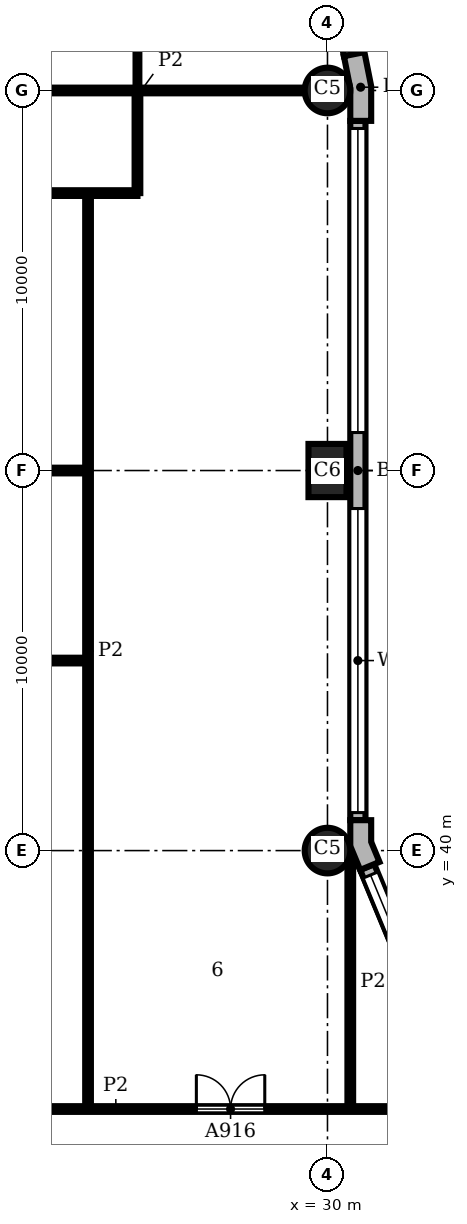
"""IFC4 building model, lengths in metres.
Left out: names, types, materials, properties, quantities, classifications, styles, units other than length and angle.
Written with IfcOpenShell. Run it as: python <this file> out.ifc"""

import sys

from ifc_helpers import new_model, si_unit, direction, frame, frame_2d, origin, origin_2d, place, context, subcontext, project, spatial, polyline, rectangle, circle, outline, extrude, element, fill, save


model = new_model("IFC4")
c1 = context("Model", 3, precision=1e-05, world=origin(), true_north=direction((0.0, 1.0)))
c2 = subcontext(c1, "Body", "Model", "MODEL_VIEW")
j1 = project(units=[si_unit("LENGTHUNIT", "METRE"), si_unit("PLANEANGLEUNIT", "RADIAN")], contexts=[c1])
p1 = place(None, origin())
s1 = spatial("IfcSite", under=j1, at=p1, CompositionType="ELEMENT")
p2 = place(p1, origin())
s2 = spatial("IfcBuilding", under=s1, at=p2, CompositionType="ELEMENT")
p3 = place(p2, frame((0.0, 0.0, 105.6)))
s3 = spatial("IfcBuildingStorey", under=s2, at=p3, CompositionType="ELEMENT", Elevation=105.6)
p4 = place(p3, frame((30.0, 40.0, 0.0), z_axis=(0.0, 0.0, 1.0), x_axis=(1.0, 0.0, 0.0)))
e1 = element("IfcColumn", 1, at=p4, inside=s3, PredefinedType="COLUMN", context=c2, shape_type="SweptSolid", body=[
    extrude(circle(Radius=0.6, at=origin_2d()), origin(), (0.0, 0.0, 1.0), 3.9),
])
p5 = place(p3, frame((30.0, 50.0, 0.0), z_axis=(0.0, 0.0, 1.0), x_axis=(0.0, 1.0, 0.0)))
e2 = element("IfcColumn", 2, at=p5, inside=s3, PredefinedType="COLUMN", context=c2, shape_type="SweptSolid", body=[
    extrude(rectangle(XDim=1.4, YDim=1.0, at=origin_2d()), origin(), (0.0, 0.0, 1.0), 3.9),
])
p6 = place(p3, frame((30.0, 60.0, 0.0), z_axis=(0.0, 0.0, 1.0), x_axis=(1.0, 0.0, 0.0)))
e3 = element("IfcColumn", 3, at=p6, inside=s3, PredefinedType="COLUMN", context=c2, shape_type="SweptSolid", body=[
    extrude(circle(Radius=0.6, at=origin_2d()), origin(), (0.0, 0.0, 1.0), 3.9),
])
p7 = place(p3, origin())
e4 = element("IfcWall", 4, at=p7, inside=s3, PredefinedType="SOLIDWALL", context=c2, shape_type="SweptSolid", body=[
    extrude(outline(polyline([(31.23, 39.644), (31.369, 39.701), (31.15, 40.229), (31.15, 40.8), (31.0, 40.8), (30.6, 40.8), (30.6, 40.119), (30.861, 39.49), (31.23, 39.644)])), origin(), (0.0, 0.0, 1.0), 3.9),
])
e5 = element("IfcWall", 5, at=p7, inside=s3, PredefinedType="SOLIDWALL", context=c2, shape_type="SweptSolid", body=[
    extrude(outline(polyline([(31.0, 59.2), (31.15, 59.2), (31.15, 60.113), (30.972, 61.009), (30.825, 60.98), (30.432, 60.902), (30.6, 60.059), (30.6, 59.2), (31.0, 59.2)])), origin(), (0.0, 0.0, 1.0), 3.9),
])
p8 = place(p3, frame((33.362, 33.974, 0.0), z_axis=(0.0, 0.0, 1.0), x_axis=(-0.382655745237, 0.923891000409, 0.0)))
e6 = element("IfcWall", 6, at=p8, inside=s3, PredefinedType="SOLIDWALL", context=c2, shape_type="SweptSolid", body=[
    extrude(rectangle(XDim=6.053, YDim=0.4, at=frame_2d((3.027, 0.0))), origin(), (0.0, 0.0, 1.0), 3.9),
])
p9 = place(p8, frame((0.227, 0.0, 0.9)))
e7 = element("IfcOpeningElement", 7, at=p9, cuts=e6, PredefinedType="OPENING", context=c2, shape_type="SweptSolid", body=[
    extrude(rectangle(XDim=5.6, YDim=2.35, at=frame_2d((2.8, 1.175))), frame((0.0, 0.21, 0.0), z_axis=(0.0, -1.0, 0.0), x_axis=(1.0, 0.0, 0.0)), (0.0, 0.0, 1.0), 0.42),
])
p10 = place(p3, frame((30.8, 40.8, 0.0), z_axis=(0.0, 0.0, 1.0), x_axis=(0.0, 1.0, 0.0)))
e8 = element("IfcWall", 8, at=p10, inside=s3, PredefinedType="SOLIDWALL", context=c2, shape_type="SweptSolid", body=[
    extrude(rectangle(XDim=18.4, YDim=0.4, at=frame_2d((9.2, 0.0))), origin(), (0.0, 0.0, 1.0), 3.9),
])
p11 = place(p10, frame((0.2, 0.0, 0.9)))
e9 = element("IfcOpeningElement", 9, at=p11, cuts=e8, PredefinedType="OPENING", context=c2, shape_type="SweptSolid", body=[
    extrude(rectangle(XDim=8.0, YDim=2.35, at=frame_2d((4.0, 1.175))), frame((0.0, 0.21, 0.0), z_axis=(0.0, -1.0, 0.0), x_axis=(1.0, 0.0, 0.0)), (0.0, 0.0, 1.0), 0.42),
])
p12 = place(p10, frame((10.2, 0.0, 0.9)))
e10 = element("IfcOpeningElement", 10, at=p12, cuts=e8, PredefinedType="OPENING", context=c2, shape_type="SweptSolid", body=[
    extrude(rectangle(XDim=8.0, YDim=2.35, at=frame_2d((4.0, 1.175))), frame((0.0, 0.21, 0.0), z_axis=(0.0, -1.0, 0.0), x_axis=(1.0, 0.0, 0.0)), (0.0, 0.0, 1.0), 0.42),
])
p13 = place(p3, frame((30.629, 60.941, 0.0), z_axis=(0.0, 0.0, 1.0), x_axis=(-0.195098533057, 0.98078364709, 0.0)))
e11 = element("IfcWall", 11, at=p13, inside=s3, PredefinedType="SOLIDWALL", context=c2, shape_type="SweptSolid", body=[
    extrude(rectangle(XDim=4.753, YDim=0.4, at=frame_2d((2.376, 0.0))), origin(), (0.0, 0.0, 1.0), 3.9),
])
p14 = place(p13, frame((0.226, 0.0, 0.9)))
e12 = element("IfcOpeningElement", 12, at=p14, cuts=e11, PredefinedType="OPENING", context=c2, shape_type="SweptSolid", body=[
    extrude(rectangle(XDim=4.3, YDim=2.35, at=frame_2d((2.15, 1.175))), frame((0.0, 0.21, 0.0), z_axis=(0.0, -1.0, 0.0), x_axis=(1.0, 0.0, 0.0)), (0.0, 0.0, 1.0), 0.42),
])
p15 = place(p3, frame((25.0, 60.0, 0.0), z_axis=(0.0, 0.0, 1.0), x_axis=(0.0, 1.0, 0.0)))
e13 = element("IfcWall", 13, at=p15, inside=s3, PredefinedType="PARTITIONING", context=c2, shape_type="SweptSolid", body=[
    extrude(rectangle(XDim=8.0, YDim=0.1, at=frame_2d((4.0, 0.0))), origin(), (0.0, 0.0, 1.0), 3.58),
])
p16 = place(p15, frame((4.35, 0.0, 0.0)))
e14 = element("IfcOpeningElement", 14, at=p16, cuts=e13, PredefinedType="OPENING", context=c2, shape_type="SweptSolid", body=[
    extrude(rectangle(XDim=0.9, YDim=2.1, at=frame_2d((0.45, 1.05))), frame((0.0, 0.06, 0.0), z_axis=(0.0, -1.0, 0.0), x_axis=(1.0, 0.0, 0.0)), (0.0, 0.0, 1.0), 0.12),
])
p17 = place(p3, frame((23.7, 33.2, 0.0), z_axis=(0.0, 0.0, 1.0), x_axis=(0.0, 1.0, 0.0)))
e15 = element("IfcWall", 15, at=p17, inside=s3, PredefinedType="PARTITIONING", context=c2, shape_type="SweptSolid", body=[
    extrude(rectangle(XDim=24.1, YDim=0.15, at=frame_2d((12.05, 0.0))), origin(), (0.0, 0.0, 1.0), 3.58),
])
p18 = place(p3, frame((25.0, 57.3, 0.0), z_axis=(0.0, 0.0, 1.0), x_axis=(0.0, 1.0, 0.0)))
e16 = element("IfcWall", 16, at=p18, inside=s3, PredefinedType="PARTITIONING", context=c2, shape_type="SweptSolid", body=[
    extrude(rectangle(XDim=2.7, YDim=0.15, at=frame_2d((1.35, 0.0))), origin(), (0.0, 0.0, 1.0), 3.58),
])
p19 = place(p3, frame((30.6, 33.2, 0.0), z_axis=(0.0, 0.0, 1.0), x_axis=(0.0, 1.0, 0.0)))
e17 = element("IfcWall", 17, at=p19, inside=s3, PredefinedType="PARTITIONING", context=c2, shape_type="SweptSolid", body=[
    extrude(rectangle(XDim=6.699, YDim=0.15, at=frame_2d((3.35, 0.0))), origin(), (0.0, 0.0, 1.0), 3.58),
])
p20 = place(p3, frame((16.5, 33.2, 0.0), z_axis=(0.0, 0.0, 1.0), x_axis=(1.0, 0.0, 0.0)))
e18 = element("IfcWall", 18, at=p20, inside=s3, PredefinedType="PARTITIONING", context=c2, shape_type="SweptSolid", body=[
    extrude(rectangle(XDim=15.862, YDim=0.15, at=frame_2d((7.931, 0.0))), origin(), (0.0, 0.0, 1.0), 3.58),
])
p21 = place(p20, frame((10.05, 0.0, 0.0)))
e19 = element("IfcOpeningElement", 19, at=p21, cuts=e18, PredefinedType="OPENING", context=c2, shape_type="SweptSolid", body=[
    extrude(rectangle(XDim=1.8, YDim=2.1, at=frame_2d((0.9, 1.05))), frame((0.0, 0.085, 0.0), z_axis=(0.0, -1.0, 0.0), x_axis=(1.0, 0.0, 0.0)), (0.0, 0.0, 1.0), 0.17),
])
p22 = place(p3, frame((16.5, 45.0, 0.0), z_axis=(0.0, 0.0, 1.0), x_axis=(1.0, 0.0, 0.0)))
e20 = element("IfcWall", 20, at=p22, inside=s3, PredefinedType="PARTITIONING", context=c2, shape_type="SweptSolid", body=[
    extrude(rectangle(XDim=7.2, YDim=0.15, at=frame_2d((3.6, 0.0))), origin(), (0.0, 0.0, 1.0), 3.58),
])
p23 = place(p3, frame((20.8, 50.0, 0.0), z_axis=(0.0, 0.0, 1.0), x_axis=(1.0, 0.0, 0.0)))
e21 = element("IfcWall", 21, at=p23, inside=s3, PredefinedType="PARTITIONING", context=c2, shape_type="SweptSolid", body=[
    extrude(rectangle(XDim=2.9, YDim=0.15, at=frame_2d((1.45, 0.0))), origin(), (0.0, 0.0, 1.0), 3.58),
])
p24 = place(p3, frame((16.5, 57.3, 0.0), z_axis=(0.0, 0.0, 1.0), x_axis=(1.0, 0.0, 0.0)))
e22 = element("IfcWall", 22, at=p24, inside=s3, PredefinedType="PARTITIONING", context=c2, shape_type="SweptSolid", body=[
    extrude(rectangle(XDim=8.5, YDim=0.15, at=frame_2d((4.25, 0.0))), origin(), (0.0, 0.0, 1.0), 3.58),
])
p25 = place(p3, frame((20.8, 60.0, 0.0), z_axis=(0.0, 0.0, 1.0), x_axis=(1.0, 0.0, 0.0)))
e23 = element("IfcWall", 23, at=p25, inside=s3, PredefinedType="PARTITIONING", context=c2, shape_type="SweptSolid", body=[
    extrude(rectangle(XDim=8.6, YDim=0.15, at=frame_2d((4.3, 0.0))), origin(), (0.0, 0.0, 1.0), 3.58),
])
p26 = place(p9, origin())
e24 = element("IfcWindow", 24, at=p26, inside=s3, PartitioningType="SINGLE_PANEL", PredefinedType="WINDOW", context=c2, shape_type="SweptSolid", body=[
    extrude(rectangle(XDim=5.6, YDim=2.35, at=frame_2d((2.8, 1.175))), frame((0.0, 0.16, 0.0), z_axis=(0.0, -1.0, 0.0), x_axis=(1.0, 0.0, 0.0)), (0.0, 0.0, 1.0), 0.06),
])
fill(e7, e24)
p27 = place(p11, origin())
e25 = element("IfcWindow", 25, at=p27, inside=s3, PartitioningType="SINGLE_PANEL", PredefinedType="WINDOW", context=c2, shape_type="SweptSolid", body=[
    extrude(rectangle(XDim=8.0, YDim=2.35, at=frame_2d((4.0, 1.175))), frame((0.0, 0.16, 0.0), z_axis=(0.0, -1.0, 0.0), x_axis=(1.0, 0.0, 0.0)), (0.0, 0.0, 1.0), 0.06),
])
fill(e9, e25)
p28 = place(p12, origin())
e26 = element("IfcWindow", 26, at=p28, inside=s3, PartitioningType="SINGLE_PANEL", PredefinedType="WINDOW", context=c2, shape_type="SweptSolid", body=[
    extrude(rectangle(XDim=8.0, YDim=2.35, at=frame_2d((4.0, 1.175))), frame((0.0, 0.16, 0.0), z_axis=(0.0, -1.0, 0.0), x_axis=(1.0, 0.0, 0.0)), (0.0, 0.0, 1.0), 0.06),
])
fill(e10, e26)
p29 = place(p21, origin())
e27 = element("IfcDoor", 27, at=p29, inside=s3, OperationType="DOUBLE_DOOR_SINGLE_SWING", PredefinedType="DOOR", context=c2, shape_type="SweptSolid", body=[
    extrude(rectangle(XDim=1.8, YDim=2.1, at=frame_2d((0.9, 1.05))), frame((0.0, 0.025, 0.0), z_axis=(0.0, -1.0, 0.0), x_axis=(1.0, 0.0, 0.0)), (0.0, 0.0, 1.0), 0.05),
])
fill(e19, e27)
save(model, sys.argv[1])
